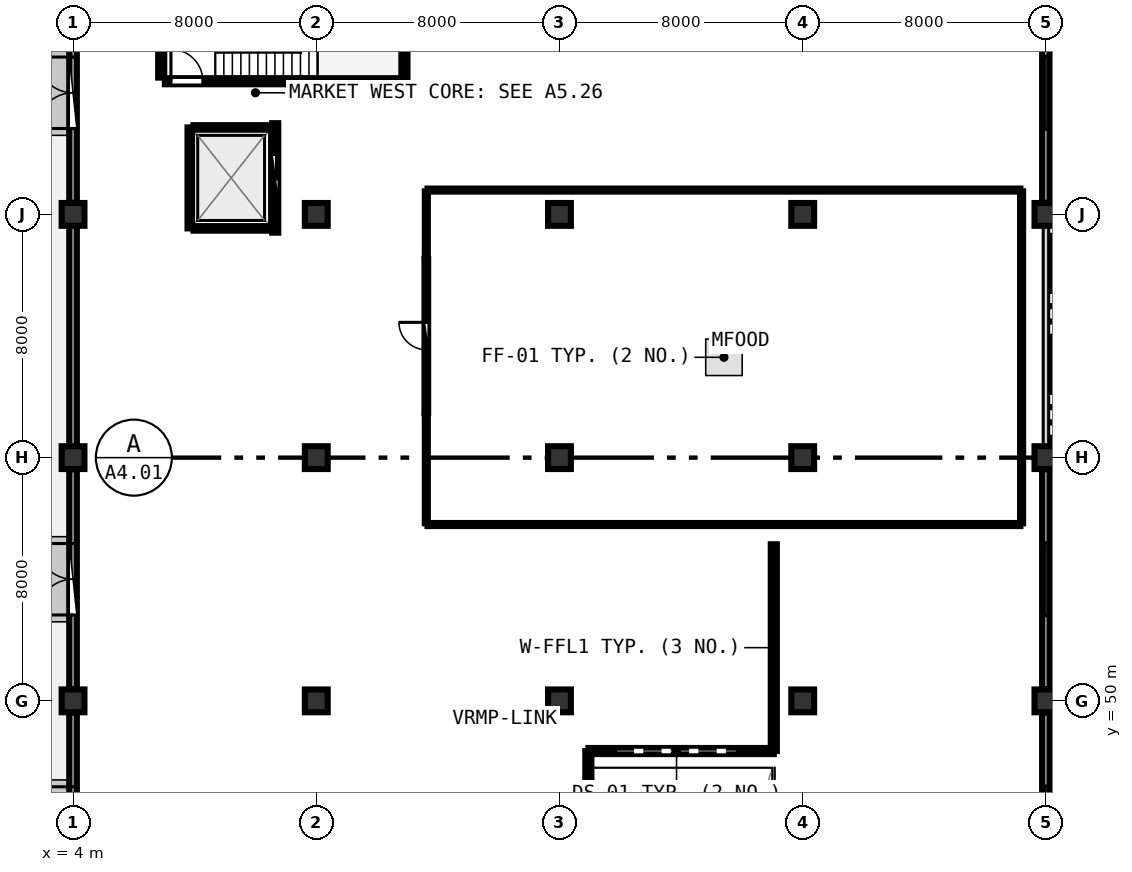
"""IFC4 building model, lengths in metres.
Left out: names, types, materials, properties, quantities, classifications, styles, units other than length and angle.
Written with IfcOpenShell. Run it as: python <this file> out.ifc"""

import sys

from ifc_helpers import new_model, si_unit, direction, frame, frame_2d, origin, origin_2d, place, context, subcontext, project, spatial, rectangle, extrude, element, fill, save


model = new_model("IFC4")
c1 = context("Model", 3, precision=1e-05, world=origin(), true_north=direction((0.0, 1.0)))
c2 = subcontext(c1, "Body", "Model", "MODEL_VIEW")
j1 = project(units=[si_unit("LENGTHUNIT", "METRE"), si_unit("PLANEANGLEUNIT", "RADIAN")], contexts=[c1])
p1 = place(None, origin())
s1 = spatial("IfcSite", under=j1, at=p1, CompositionType="ELEMENT")
p2 = place(p1, origin())
s2 = spatial("IfcBuilding", under=s1, at=p2, CompositionType="ELEMENT")
p3 = place(p2, origin())
s3 = spatial("IfcBuildingStorey", under=s2, at=p3, CompositionType="ELEMENT", Elevation=0.0)
for number, where, z_axis, x_axis in (
    (1, (4.0, 50.0, 0.0), (0.0, 0.0, 1.0), (1.0, 0.0, 0.0)),
    (2, (4.0, 58.0, 0.0), (0.0, 0.0, 1.0), (1.0, 0.0, 0.0)),
    (3, (4.0, 66.0, 0.0), (0.0, 0.0, 1.0), (1.0, 0.0, 0.0)),
    (4, (12.0, 50.0, 0.0), (0.0, 0.0, 1.0), (1.0, 0.0, 0.0)),
    (5, (12.0, 58.0, 0.0), (0.0, 0.0, 1.0), (1.0, 0.0, 0.0)),
    (6, (12.0, 66.0, 0.0), (0.0, 0.0, 1.0), (1.0, 0.0, 0.0)),
    (7, (20.0, 50.0, 0.0), (0.0, 0.0, 1.0), (1.0, 0.0, 0.0)),
    (8, (20.0, 58.0, 0.0), (0.0, 0.0, 1.0), (1.0, 0.0, 0.0)),
    (9, (20.0, 66.0, 0.0), (0.0, 0.0, 1.0), (1.0, 0.0, 0.0)),
    (10, (28.0, 50.0, 0.0), (0.0, 0.0, 1.0), (1.0, 0.0, 0.0)),
    (11, (28.0, 58.0, 0.0), (0.0, 0.0, 1.0), (1.0, 0.0, 0.0)),
    (12, (28.0, 66.0, 0.0), (0.0, 0.0, 1.0), (1.0, 0.0, 0.0)),
    (13, (36.0, 50.0, 0.0), (0.0, 0.0, 1.0), (1.0, 0.0, 0.0)),
    (14, (36.0, 58.0, 0.0), (0.0, 0.0, 1.0), (1.0, 0.0, 0.0)),
    (15, (36.0, 66.0, 0.0), (0.0, 0.0, 1.0), (1.0, 0.0, 0.0)),
):
    element("IfcColumn", number, at=place(p3, frame(where, z_axis=z_axis, x_axis=x_axis)), inside=s3, PredefinedType="COLUMN", context=c2, shape_type="SweptSolid", body=[
        extrude(rectangle(XDim=0.75, YDim=0.75, at=origin_2d()), origin(), (0.0, 0.0, 1.0), 4.5),
    ])
p4 = place(p3, frame((36.0, 42.38, 0.0), z_axis=(0.0, 0.0, 1.0), x_axis=(0.0, 1.0, 0.0)))
e16 = element("IfcWall", 16, at=p4, inside=s3, PredefinedType="SOLIDWALL", context=c2, shape_type="SweptSolid", body=[
    extrude(rectangle(XDim=7.24, YDim=0.25, at=frame_2d((3.62, 0.0))), origin(), (0.0, 0.0, 1.0), 3.42),
])
p5 = place(p4, frame((2.42, 0.0, 0.95)))
e17 = element("IfcOpeningElement", 17, at=p5, cuts=e16, PredefinedType="OPENING", context=c2, shape_type="SweptSolid", body=[
    extrude(rectangle(XDim=2.4, YDim=1.65, at=frame_2d((1.2, 0.825))), frame((0.0, 0.135, 0.0), z_axis=(0.0, -1.0, 0.0), x_axis=(1.0, 0.0, 0.0)), (0.0, 0.0, 1.0), 0.27),
])
p6 = place(p3, frame((36.0, 50.38, 0.0), z_axis=(0.0, 0.0, 1.0), x_axis=(0.0, 1.0, 0.0)))
e18 = element("IfcWall", 18, at=p6, inside=s3, PredefinedType="SOLIDWALL", context=c2, shape_type="SweptSolid", body=[
    extrude(rectangle(XDim=7.24, YDim=0.25, at=frame_2d((3.62, 0.0))), origin(), (0.0, 0.0, 1.0), 3.42),
])
p7 = place(p6, frame((2.42, 0.0, 0.95)))
e19 = element("IfcOpeningElement", 19, at=p7, cuts=e18, PredefinedType="OPENING", context=c2, shape_type="SweptSolid", body=[
    extrude(rectangle(XDim=2.4, YDim=1.65, at=frame_2d((1.2, 0.825))), frame((0.0, 0.135, 0.0), z_axis=(0.0, -1.0, 0.0), x_axis=(1.0, 0.0, 0.0)), (0.0, 0.0, 1.0), 0.27),
])
p8 = place(p3, frame((36.0, 66.38, 0.0), z_axis=(0.0, 0.0, 1.0), x_axis=(0.0, 1.0, 0.0)))
e20 = element("IfcWall", 20, at=p8, inside=s3, PredefinedType="SOLIDWALL", context=c2, shape_type="SweptSolid", body=[
    extrude(rectangle(XDim=7.24, YDim=0.25, at=frame_2d((3.62, 0.0))), origin(), (0.0, 0.0, 1.0), 3.42),
])
p9 = place(p8, frame((2.42, 0.0, 0.95)))
e21 = element("IfcOpeningElement", 21, at=p9, cuts=e20, PredefinedType="OPENING", context=c2, shape_type="SweptSolid", body=[
    extrude(rectangle(XDim=2.4, YDim=1.65, at=frame_2d((1.2, 0.825))), frame((0.0, 0.135, 0.0), z_axis=(0.0, -1.0, 0.0), x_axis=(1.0, 0.0, 0.0)), (0.0, 0.0, 1.0), 0.27),
])
p10 = place(p3, frame((4.0, 73.62, 0.0), z_axis=(0.0, 0.0, 1.0), x_axis=(0.0, -1.0, 0.0)))
e22 = element("IfcWall", 22, at=p10, inside=s3, PredefinedType="SOLIDWALL", context=c2, shape_type="SweptSolid", body=[
    extrude(rectangle(XDim=7.24, YDim=0.25, at=frame_2d((3.62, 0.0))), origin(), (0.0, 0.0, 1.0), 3.42),
])
p11 = place(p10, frame((2.445, 0.0, 0.0)))
e23 = element("IfcOpeningElement", 23, at=p11, cuts=e22, PredefinedType="OPENING", context=c2, shape_type="SweptSolid", body=[
    extrude(rectangle(XDim=2.35, YDim=2.3, at=frame_2d((1.175, 1.15))), frame((0.0, 0.135, 0.0), z_axis=(0.0, -1.0, 0.0), x_axis=(1.0, 0.0, 0.0)), (0.0, 0.0, 1.0), 0.27),
])
p12 = place(p3, frame((4.0, 65.62, 0.0), z_axis=(0.0, 0.0, 1.0), x_axis=(0.0, -1.0, 0.0)))
e24 = element("IfcWall", 24, at=p12, inside=s3, PredefinedType="SOLIDWALL", context=c2, shape_type="SweptSolid", body=[
    extrude(rectangle(XDim=7.24, YDim=0.25, at=frame_2d((3.62, 0.0))), origin(), (0.0, 0.0, 1.0), 3.42),
])
p13 = place(p3, frame((4.0, 57.62, 0.0), z_axis=(0.0, 0.0, 1.0), x_axis=(0.0, -1.0, 0.0)))
e25 = element("IfcWall", 25, at=p13, inside=s3, PredefinedType="SOLIDWALL", context=c2, shape_type="SweptSolid", body=[
    extrude(rectangle(XDim=7.24, YDim=0.25, at=frame_2d((3.62, 0.0))), origin(), (0.0, 0.0, 1.0), 3.42),
])
p14 = place(p13, frame((2.445, 0.0, 0.0)))
e26 = element("IfcOpeningElement", 26, at=p14, cuts=e25, PredefinedType="OPENING", context=c2, shape_type="SweptSolid", body=[
    extrude(rectangle(XDim=2.35, YDim=2.3, at=frame_2d((1.175, 1.15))), frame((0.0, 0.135, 0.0), z_axis=(0.0, -1.0, 0.0), x_axis=(1.0, 0.0, 0.0)), (0.0, 0.0, 1.0), 0.27),
])
p15 = place(p3, frame((4.0, 49.62, 0.0), z_axis=(0.0, 0.0, 1.0), x_axis=(0.0, -1.0, 0.0)))
e27 = element("IfcWall", 27, at=p15, inside=s3, PredefinedType="SOLIDWALL", context=c2, shape_type="SweptSolid", body=[
    extrude(rectangle(XDim=7.24, YDim=0.25, at=frame_2d((3.62, 0.0))), origin(), (0.0, 0.0, 1.0), 3.42),
])
p16 = place(p15, frame((2.445, 0.0, 0.0)))
e28 = element("IfcOpeningElement", 28, at=p16, cuts=e27, PredefinedType="OPENING", context=c2, shape_type="SweptSolid", body=[
    extrude(rectangle(XDim=2.35, YDim=2.3, at=frame_2d((1.175, 1.15))), frame((0.0, 0.135, 0.0), z_axis=(0.0, -1.0, 0.0), x_axis=(1.0, 0.0, 0.0)), (0.0, 0.0, 1.0), 0.27),
])
p17 = place(p3, frame((7.02, 70.38, 0.0), z_axis=(0.0, 0.0, 1.0), x_axis=(1.0, 0.0, 0.0)))
e29 = element("IfcWall", 29, at=p17, inside=s3, PredefinedType="SHEAR", context=c2, shape_type="SweptSolid", body=[
    extrude(rectangle(XDim=7.76, YDim=0.2, at=frame_2d((3.88, 0.0))), origin(), (0.0, 0.0, 1.0), 4.24),
])
p18 = place(p17, frame((0.2, 0.0, 0.0)))
e30 = element("IfcOpeningElement", 30, at=p18, cuts=e29, PredefinedType="OPENING", context=c2, shape_type="SweptSolid", body=[
    extrude(rectangle(XDim=1.05, YDim=2.1, at=frame_2d((0.525, 1.05))), frame((0.0, 0.11, 0.0), z_axis=(0.0, -1.0, 0.0), x_axis=(1.0, 0.0, 0.0)), (0.0, 0.0, 1.0), 0.22),
])
for number, where, z_axis, x_axis in (
    (31, (14.9, 70.5, 0.0), (0.0, 0.0, 1.0), (0.0, 1.0, 0.0)),
    (32, (6.9, 73.97, 0.0), (0.0, 0.0, 1.0), (0.0, -1.0, 0.0)),
):
    element("IfcWall", number, at=place(p3, frame(where, z_axis=z_axis, x_axis=x_axis)), inside=s3, PredefinedType="SHEAR", context=c2, shape_type="SweptSolid", body=[
        extrude(rectangle(XDim=3.47, YDim=0.2, at=frame_2d((1.735, 0.0))), origin(), (0.0, 0.0, 1.0), 4.24),
    ])
p19 = place(p3, frame((20.95, 48.35, 0.0), z_axis=(0.0, 0.0, 1.0), x_axis=(1.0, 0.0, 0.0)))
e33 = element("IfcWall", 33, at=p19, inside=s3, PredefinedType="SOLIDWALL", context=c2, shape_type="SweptSolid", body=[
    extrude(rectangle(XDim=6.1, YDim=0.2, at=frame_2d((3.05, 0.0))), origin(), (0.0, 0.0, 1.0), 4.19),
])
p20 = place(p19, frame((0.9, 0.0, 0.0)))
e34 = element("IfcOpeningElement", 34, at=p20, cuts=e33, PredefinedType="OPENING", context=c2, shape_type="SweptSolid", body=[
    extrude(rectangle(XDim=4.0, YDim=3.2, at=frame_2d((2.0, 1.6))), frame((0.0, 0.11, 0.0), z_axis=(0.0, -1.0, 0.0), x_axis=(1.0, 0.0, 0.0)), (0.0, 0.0, 1.0), 0.22),
])
p21 = place(p3, frame((20.95, 48.35, 0.0), z_axis=(0.0, 0.0, 1.0), x_axis=(0.0, -1.0, 0.0)))
e35 = element("IfcWall", 35, at=p21, inside=s3, PredefinedType="SOLIDWALL", context=c2, shape_type="SweptSolid", body=[
    extrude(rectangle(XDim=1.85, YDim=0.2, at=frame_2d((0.925, 0.0))), origin(), (0.0, 0.0, 1.0), 4.19),
])
p22 = place(p3, frame((27.05, 48.35, 0.0), z_axis=(0.0, 0.0, 1.0), x_axis=(0.0, 1.0, 0.0)))
e36 = element("IfcWall", 36, at=p22, inside=s3, PredefinedType="SOLIDWALL", context=c2, shape_type="SweptSolid", body=[
    extrude(rectangle(XDim=6.8, YDim=0.2, at=frame_2d((3.4, 0.0))), origin(), (0.0, 0.0, 1.0), 3.425),
])
p23 = place(p3, frame((10.65, 65.4, 0.0), z_axis=(0.0, 0.0, 1.0), x_axis=(0.0, 1.0, 0.0)))
e37 = element("IfcWall", 37, at=p23, inside=s3, PredefinedType="SOLIDWALL", context=c2, shape_type="SweptSolid", body=[
    extrude(rectangle(XDim=3.6, YDim=0.2, at=frame_2d((1.8, 0.0))), origin(), (0.0, 0.0, 1.0), 3.425),
])
p24 = place(p23, frame((1.02, 0.0, 0.0)))
e38 = element("IfcOpeningElement", 38, at=p24, cuts=e37, PredefinedType="OPENING", context=c2, shape_type="SweptSolid", body=[
    extrude(rectangle(XDim=1.55, YDim=2.2, at=frame_2d((0.775, 1.1))), frame((0.0, 0.11, 0.0), z_axis=(0.0, -1.0, 0.0), x_axis=(1.0, 0.0, 0.0)), (0.0, 0.0, 1.0), 0.22),
])
p25 = place(p3, frame((7.84, 65.54, 0.0), z_axis=(0.0, 0.0, 1.0), x_axis=(0.0, 1.0, 0.0)))
e39 = element("IfcWall", 39, at=p25, inside=s3, PredefinedType="PARTITIONING", context=c2, shape_type="SweptSolid", body=[
    extrude(rectangle(XDim=3.32, YDim=0.15, at=frame_2d((1.66, 0.0))), origin(), (0.0, 0.0, 1.0), 3.425),
])
for number, where, z_axis, x_axis in (
    (40, (7.96, 65.54, 0.0), (0.0, 0.0, 1.0), (1.0, 0.0, 0.0)),
    (41, (7.96, 68.86, 0.0), (0.0, 0.0, 1.0), (1.0, 0.0, 0.0)),
):
    element("IfcWall", number, at=place(p3, frame(where, z_axis=z_axis, x_axis=x_axis)), inside=s3, PredefinedType="PARTITIONING", context=c2, shape_type="SweptSolid", body=[
        extrude(rectangle(XDim=2.56, YDim=0.15, at=frame_2d((1.28, 0.0))), origin(), (0.0, 0.0, 1.0), 4.23),
    ])
p26 = place(p3, frame((15.62, 59.46, 0.0), z_axis=(0.0, 0.0, 1.0), x_axis=(0.0, 1.0, 0.0)))
e42 = element("IfcWall", 42, at=p26, inside=s3, PredefinedType="PARTITIONING", context=c2, shape_type="SweptSolid", body=[
    extrude(rectangle(XDim=5.08, YDim=0.12, at=frame_2d((2.54, 0.0))), origin(), (0.0, 0.0, 1.0), 4.19),
])
p27 = place(p26, frame((2.09, 0.0, 0.0)))
e43 = element("IfcOpeningElement", 43, at=p27, cuts=e42, PredefinedType="OPENING", context=c2, shape_type="SweptSolid", body=[
    extrude(rectangle(XDim=0.9, YDim=2.08, at=frame_2d((0.45, 1.04))), frame((0.0, 0.07, 0.0), z_axis=(0.0, -1.0, 0.0), x_axis=(1.0, 0.0, 0.0)), (0.0, 0.0, 1.0), 0.14),
])
p28 = place(p3, frame((15.66, 55.8, 0.0), z_axis=(0.0, 0.0, 1.0), x_axis=(1.0, 0.0, 0.0)))
e44 = element("IfcWall", 44, at=p28, inside=s3, PredefinedType="PARTITIONING", context=c2, shape_type="SweptSolid", body=[
    extrude(rectangle(XDim=19.5, YDim=0.1, at=frame_2d((9.75, 0.0))), origin(), (0.0, 0.0, 1.0), 3.425),
])
p29 = place(p3, frame((35.2, 55.84, 0.0), z_axis=(0.0, 0.0, 1.0), x_axis=(0.0, 1.0, 0.0)))
e45 = element("IfcWall", 45, at=p29, inside=s3, PredefinedType="PARTITIONING", context=c2, shape_type="SweptSolid", body=[
    extrude(rectangle(XDim=10.92, YDim=0.1, at=frame_2d((5.46, 0.0))), origin(), (0.0, 0.0, 1.0), 3.425),
])
p30 = place(p3, frame((35.16, 66.8, 0.0), z_axis=(0.0, 0.0, 1.0), x_axis=(-1.0, 0.0, 0.0)))
e46 = element("IfcWall", 46, at=p30, inside=s3, PredefinedType="PARTITIONING", context=c2, shape_type="SweptSolid", body=[
    extrude(rectangle(XDim=19.5, YDim=0.1, at=frame_2d((9.75, 0.0))), origin(), (0.0, 0.0, 1.0), 3.425),
])
p31 = place(p3, frame((15.62, 66.76, 0.0), z_axis=(0.0, 0.0, 1.0), x_axis=(0.0, -1.0, 0.0)))
e47 = element("IfcWall", 47, at=p31, inside=s3, PredefinedType="PARTITIONING", context=c2, shape_type="SweptSolid", body=[
    extrude(rectangle(XDim=2.22, YDim=0.1, at=frame_2d((1.11, 0.0))), origin(), (0.0, 0.0, 1.0), 3.425),
])
p32 = place(p3, frame((15.62, 59.46, 0.0), z_axis=(0.0, 0.0, 1.0), x_axis=(0.0, -1.0, 0.0)))
e48 = element("IfcWall", 48, at=p32, inside=s3, PredefinedType="PARTITIONING", context=c2, shape_type="SweptSolid", body=[
    extrude(rectangle(XDim=3.62, YDim=0.1, at=frame_2d((1.81, 0.0))), origin(), (0.0, 0.0, 1.0), 3.425),
])
p33 = place(p5, origin())
e49 = element("IfcWindow", 49, at=p33, inside=s3, PartitioningType="SINGLE_PANEL", PredefinedType="WINDOW", context=c2, shape_type="SweptSolid", body=[
    extrude(rectangle(XDim=2.4, YDim=1.65, at=frame_2d((1.2, 0.825))), frame((0.0, 0.03, 0.0), z_axis=(0.0, -1.0, 0.0), x_axis=(1.0, 0.0, 0.0)), (0.0, 0.0, 1.0), 0.06),
])
fill(e17, e49)
p34 = place(p7, origin())
e50 = element("IfcWindow", 50, at=p34, inside=s3, PartitioningType="SINGLE_PANEL", PredefinedType="WINDOW", context=c2, shape_type="SweptSolid", body=[
    extrude(rectangle(XDim=2.4, YDim=1.65, at=frame_2d((1.2, 0.825))), frame((0.0, 0.03, 0.0), z_axis=(0.0, -1.0, 0.0), x_axis=(1.0, 0.0, 0.0)), (0.0, 0.0, 1.0), 0.06),
])
fill(e19, e50)
p35 = place(p9, origin())
e51 = element("IfcWindow", 51, at=p35, inside=s3, PartitioningType="SINGLE_PANEL", PredefinedType="WINDOW", context=c2, shape_type="SweptSolid", body=[
    extrude(rectangle(XDim=2.4, YDim=1.65, at=frame_2d((1.2, 0.825))), frame((0.0, 0.03, 0.0), z_axis=(0.0, -1.0, 0.0), x_axis=(1.0, 0.0, 0.0)), (0.0, 0.0, 1.0), 0.06),
])
fill(e21, e51)
p36 = place(p11, frame((2.35, 0.0, 0.0), z_axis=(0.0, 0.0, 1.0), x_axis=(-1.0, 0.0, 0.0)))
e52 = element("IfcDoor", 52, at=p36, inside=s3, OperationType="DOUBLE_DOOR_SINGLE_SWING", PredefinedType="DOOR", context=c2, shape_type="SweptSolid", body=[
    extrude(rectangle(XDim=2.35, YDim=2.3, at=frame_2d((1.175, 1.15))), frame((0.0, 0.025, 0.0), z_axis=(0.0, -1.0, 0.0), x_axis=(1.0, 0.0, 0.0)), (0.0, 0.0, 1.0), 0.05),
])
fill(e23, e52)
p37 = place(p14, frame((2.35, 0.0, 0.0), z_axis=(0.0, 0.0, 1.0), x_axis=(-1.0, 0.0, 0.0)))
e53 = element("IfcDoor", 53, at=p37, inside=s3, OperationType="DOUBLE_DOOR_SINGLE_SWING", PredefinedType="DOOR", context=c2, shape_type="SweptSolid", body=[
    extrude(rectangle(XDim=2.35, YDim=2.3, at=frame_2d((1.175, 1.15))), frame((0.0, 0.025, 0.0), z_axis=(0.0, -1.0, 0.0), x_axis=(1.0, 0.0, 0.0)), (0.0, 0.0, 1.0), 0.05),
])
fill(e26, e53)
p38 = place(p16, frame((2.35, 0.0, 0.0), z_axis=(0.0, 0.0, 1.0), x_axis=(-1.0, 0.0, 0.0)))
e54 = element("IfcDoor", 54, at=p38, inside=s3, OperationType="DOUBLE_DOOR_SINGLE_SWING", PredefinedType="DOOR", context=c2, shape_type="SweptSolid", body=[
    extrude(rectangle(XDim=2.35, YDim=2.3, at=frame_2d((1.175, 1.15))), frame((0.0, 0.025, 0.0), z_axis=(0.0, -1.0, 0.0), x_axis=(1.0, 0.0, 0.0)), (0.0, 0.0, 1.0), 0.05),
])
fill(e28, e54)
p39 = place(p18, origin())
e55 = element("IfcDoor", 55, at=p39, inside=s3, OperationType="SINGLE_SWING_LEFT", PredefinedType="DOOR", context=c2, shape_type="SweptSolid", body=[
    extrude(rectangle(XDim=1.05, YDim=2.1, at=frame_2d((0.525, 1.05))), frame((0.0, 0.025, 0.0), z_axis=(0.0, -1.0, 0.0), x_axis=(1.0, 0.0, 0.0)), (0.0, 0.0, 1.0), 0.05),
])
fill(e30, e55)
p40 = place(p20, frame((4.0, 0.0, 0.0), z_axis=(0.0, 0.0, 1.0), x_axis=(-1.0, 0.0, 0.0)))
e56 = element("IfcDoor", 56, at=p40, inside=s3, OperationType="ROLLINGUP", PredefinedType="GATE", context=c2, shape_type="SweptSolid", body=[
    extrude(rectangle(XDim=4.0, YDim=3.2, at=frame_2d((2.0, 1.6))), frame((0.0, 0.025, 0.0), z_axis=(0.0, -1.0, 0.0), x_axis=(1.0, 0.0, 0.0)), (0.0, 0.0, 1.0), 0.05),
])
fill(e34, e56)
p41 = place(p24, origin())
e57 = element("IfcDoor", 57, at=p41, inside=s3, OperationType="DOUBLE_DOOR_SLIDING", PredefinedType="DOOR", context=c2, shape_type="SweptSolid", body=[
    extrude(rectangle(XDim=1.55, YDim=2.2, at=frame_2d((0.775, 1.1))), frame((0.0, 0.025, 0.0), z_axis=(0.0, -1.0, 0.0), x_axis=(1.0, 0.0, 0.0)), (0.0, 0.0, 1.0), 0.05),
])
fill(e38, e57)
p42 = place(p27, origin())
e58 = element("IfcDoor", 58, at=p42, inside=s3, OperationType="SINGLE_SWING_RIGHT", PredefinedType="DOOR", context=c2, shape_type="SweptSolid", body=[
    extrude(rectangle(XDim=0.9, YDim=2.08, at=frame_2d((0.45, 1.04))), frame((0.0, 0.025, 0.0), z_axis=(0.0, -1.0, 0.0), x_axis=(1.0, 0.0, 0.0)), (0.0, 0.0, 1.0), 0.05),
])
fill(e43, e58)
save(model, sys.argv[1])
